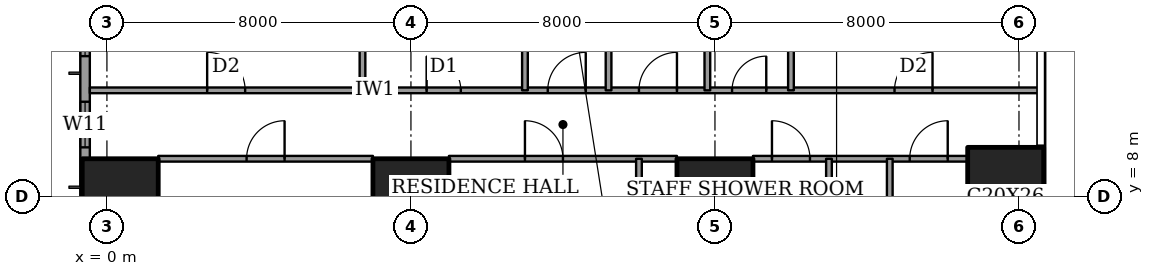
"""IFC4 building model, lengths in metres.
Left out: names, types, materials, properties, quantities, classifications, styles, units other than length and angle.
Written with IfcOpenShell. Run it as: python <this file> out.ifc"""

import sys

from ifc_helpers import new_model, si_unit, direction, frame, frame_2d, origin, origin_2d, place, context, subcontext, project, spatial, rectangle, extrude, element, fill, save


model = new_model("IFC4")
c1 = context("Model", 3, precision=1e-05, world=origin(), true_north=direction((0.0, 1.0)))
c2 = subcontext(c1, "Body", "Model", "MODEL_VIEW")
j1 = project(units=[si_unit("LENGTHUNIT", "METRE"), si_unit("PLANEANGLEUNIT", "RADIAN")], contexts=[c1])
p1 = place(None, origin())
s1 = spatial("IfcSite", under=j1, at=p1, CompositionType="ELEMENT")
p2 = place(p1, origin())
s2 = spatial("IfcBuilding", under=s1, at=p2, CompositionType="ELEMENT")
p3 = place(p2, frame((0.0, 0.0, 103.4)))
s3 = spatial("IfcBuildingStorey", under=s2, at=p3, CompositionType="ELEMENT", Elevation=103.4)
for number, where, z_axis, x_axis in (
    (1, (0.35, 8.0, 0.0), (0.0, 0.0, 1.0), (1.0, 0.0, 0.0)),
    (2, (8.0, 8.0, 0.0), (0.0, 0.0, 1.0), (1.0, 0.0, 0.0)),
    (3, (16.0, 8.0, 0.0), (0.0, 0.0, 1.0), (1.0, 0.0, 0.0)),
):
    element("IfcColumn", number, at=place(p3, frame(where, z_axis=z_axis, x_axis=x_axis)), inside=s3, PredefinedType="COLUMN", context=c2, shape_type="SweptSolid", body=[
        extrude(rectangle(XDim=2.0, YDim=2.0, at=origin_2d()), origin(), (0.0, 0.0, 1.0), 3.6),
    ])
p4 = place(p3, frame((23.65, 8.0, 0.0), z_axis=(0.0, 0.0, 1.0), x_axis=(1.0, 0.0, 0.0)))
e4 = element("IfcColumn", 4, at=p4, inside=s3, PredefinedType="COLUMN", context=c2, shape_type="SweptSolid", body=[
    extrude(rectangle(XDim=2.0, YDim=2.6, at=origin_2d()), origin(), (0.0, 0.0, 1.0), 3.6),
])
p5 = place(p3, frame((-0.575, 44.825, 0.0), z_axis=(0.0, 0.0, 1.0), x_axis=(0.0, -1.0, 0.0)))
e5 = element("IfcWall", 5, at=p5, inside=s3, PredefinedType="SOLIDWALL", context=c2, shape_type="SweptSolid", body=[
    extrude(rectangle(XDim=41.65, YDim=0.25, at=frame_2d((20.825, 0.0))), origin(), (0.0, 0.0, 1.0), 3.6),
])
p6 = place(p5, frame((0.775, 0.0, 0.4)))
e6 = element("IfcOpeningElement", 6, at=p6, cuts=e5, PredefinedType="OPENING", context=c2, shape_type="SweptSolid", body=[
    extrude(rectangle(XDim=2.4, YDim=2.2, at=frame_2d((1.2, 1.1))), frame((0.0, 0.135, 0.0), z_axis=(0.0, -1.0, 0.0), x_axis=(1.0, 0.0, 0.0)), (0.0, 0.0, 1.0), 0.27),
])
p7 = place(p5, frame((6.1, 0.0, 0.4)))
e7 = element("IfcOpeningElement", 7, at=p7, cuts=e5, PredefinedType="OPENING", context=c2, shape_type="SweptSolid", body=[
    extrude(rectangle(XDim=1.2, YDim=2.2, at=frame_2d((0.6, 1.1))), frame((0.0, 0.135, 0.0), z_axis=(0.0, -1.0, 0.0), x_axis=(1.0, 0.0, 0.0)), (0.0, 0.0, 1.0), 0.27),
])
p8 = place(p5, frame((8.425, 0.0, 0.4)))
e8 = element("IfcOpeningElement", 8, at=p8, cuts=e5, PredefinedType="OPENING", context=c2, shape_type="SweptSolid", body=[
    extrude(rectangle(XDim=2.4, YDim=2.2, at=frame_2d((1.2, 1.1))), frame((0.0, 0.135, 0.0), z_axis=(0.0, -1.0, 0.0), x_axis=(1.0, 0.0, 0.0)), (0.0, 0.0, 1.0), 0.27),
])
p9 = place(p5, frame((15.625, 0.0, 0.4)))
e9 = element("IfcOpeningElement", 9, at=p9, cuts=e5, PredefinedType="OPENING", context=c2, shape_type="SweptSolid", body=[
    extrude(rectangle(XDim=2.4, YDim=2.2, at=frame_2d((1.2, 1.1))), frame((0.0, 0.135, 0.0), z_axis=(0.0, -1.0, 0.0), x_axis=(1.0, 0.0, 0.0)), (0.0, 0.0, 1.0), 0.27),
])
p10 = place(p5, frame((23.625, 0.0, 0.4)))
e10 = element("IfcOpeningElement", 10, at=p10, cuts=e5, PredefinedType="OPENING", context=c2, shape_type="SweptSolid", body=[
    extrude(rectangle(XDim=2.4, YDim=2.2, at=frame_2d((1.2, 1.1))), frame((0.0, 0.135, 0.0), z_axis=(0.0, -1.0, 0.0), x_axis=(1.0, 0.0, 0.0)), (0.0, 0.0, 1.0), 0.27),
])
p11 = place(p5, frame((30.725, 0.0, 0.4)))
e11 = element("IfcOpeningElement", 11, at=p11, cuts=e5, PredefinedType="OPENING", context=c2, shape_type="SweptSolid", body=[
    extrude(rectangle(XDim=2.4, YDim=2.2, at=frame_2d((1.2, 1.1))), frame((0.0, 0.135, 0.0), z_axis=(0.0, -1.0, 0.0), x_axis=(1.0, 0.0, 0.0)), (0.0, 0.0, 1.0), 0.27),
])
p12 = place(p5, frame((34.325, 0.0, 0.4)))
e12 = element("IfcOpeningElement", 12, at=p12, cuts=e5, PredefinedType="OPENING", context=c2, shape_type="SweptSolid", body=[
    extrude(rectangle(XDim=1.2, YDim=2.2, at=frame_2d((0.6, 1.1))), frame((0.0, 0.135, 0.0), z_axis=(0.0, -1.0, 0.0), x_axis=(1.0, 0.0, 0.0)), (0.0, 0.0, 1.0), 0.27),
])
p13 = place(p5, frame((38.475, 0.0, 0.4)))
e13 = element("IfcOpeningElement", 13, at=p13, cuts=e5, PredefinedType="OPENING", context=c2, shape_type="SweptSolid", body=[
    extrude(rectangle(XDim=2.4, YDim=2.2, at=frame_2d((1.2, 1.1))), frame((0.0, 0.135, 0.0), z_axis=(0.0, -1.0, 0.0), x_axis=(1.0, 0.0, 0.0)), (0.0, 0.0, 1.0), 0.27),
])
p14 = place(p3, frame((1.35, 9.0, 0.0), z_axis=(0.0, 0.0, 1.0), x_axis=(1.0, 0.0, 0.0)))
e14 = element("IfcWall", 14, at=p14, inside=s3, PredefinedType="PARTITIONING", context=c2, shape_type="SweptSolid", body=[
    extrude(rectangle(XDim=5.65, YDim=0.15, at=frame_2d((2.825, 0.0))), origin(), (0.0, 0.0, 1.0), 3.35),
])
p15 = place(p14, frame((2.325, 0.0, 0.0)))
e15 = element("IfcOpeningElement", 15, at=p15, cuts=e14, PredefinedType="OPENING", context=c2, shape_type="SweptSolid", body=[
    extrude(rectangle(XDim=1.0, YDim=2.1, at=frame_2d((0.5, 1.05))), frame((0.0, 0.085, 0.0), z_axis=(0.0, -1.0, 0.0), x_axis=(1.0, 0.0, 0.0)), (0.0, 0.0, 1.0), 0.17),
])
p16 = place(p3, frame((9.0, 9.0, 0.0), z_axis=(0.0, 0.0, 1.0), x_axis=(1.0, 0.0, 0.0)))
e16 = element("IfcWall", 16, at=p16, inside=s3, PredefinedType="PARTITIONING", context=c2, shape_type="SweptSolid", body=[
    extrude(rectangle(XDim=6.0, YDim=0.15, at=frame_2d((3.0, 0.0))), origin(), (0.0, 0.0, 1.0), 3.35),
])
p17 = place(p16, frame((2.0, 0.0, 0.0)))
e17 = element("IfcOpeningElement", 17, at=p17, cuts=e16, PredefinedType="OPENING", context=c2, shape_type="SweptSolid", body=[
    extrude(rectangle(XDim=1.0, YDim=2.1, at=frame_2d((0.5, 1.05))), frame((0.0, 0.085, 0.0), z_axis=(0.0, -1.0, 0.0), x_axis=(1.0, 0.0, 0.0)), (0.0, 0.0, 1.0), 0.17),
])
p18 = place(p3, frame((17.0, 9.0, 0.0), z_axis=(0.0, 0.0, 1.0), x_axis=(1.0, 0.0, 0.0)))
e18 = element("IfcWall", 18, at=p18, inside=s3, PredefinedType="PARTITIONING", context=c2, shape_type="SweptSolid", body=[
    extrude(rectangle(XDim=5.65, YDim=0.15, at=frame_2d((2.825, 0.0))), origin(), (0.0, 0.0, 1.0), 3.35),
])
p19 = place(p18, frame((0.5, 0.0, 0.0)))
e19 = element("IfcOpeningElement", 19, at=p19, cuts=e18, PredefinedType="OPENING", context=c2, shape_type="SweptSolid", body=[
    extrude(rectangle(XDim=1.0, YDim=2.1, at=frame_2d((0.5, 1.05))), frame((0.0, 0.085, 0.0), z_axis=(0.0, -1.0, 0.0), x_axis=(1.0, 0.0, 0.0)), (0.0, 0.0, 1.0), 0.17),
])
p20 = place(p18, frame((4.125, 0.0, 0.0)))
e20 = element("IfcOpeningElement", 20, at=p20, cuts=e18, PredefinedType="OPENING", context=c2, shape_type="SweptSolid", body=[
    extrude(rectangle(XDim=1.0, YDim=2.1, at=frame_2d((0.5, 1.05))), frame((0.0, 0.085, 0.0), z_axis=(0.0, -1.0, 0.0), x_axis=(1.0, 0.0, 0.0)), (0.0, 0.0, 1.0), 0.17),
])
p21 = place(p3, frame((-0.45, 10.8, 0.0), z_axis=(0.0, 0.0, 1.0), x_axis=(1.0, 0.0, 0.0)))
e21 = element("IfcWall", 21, at=p21, inside=s3, PredefinedType="PARTITIONING", context=c2, shape_type="SweptSolid", body=[
    extrude(rectangle(XDim=25.011, YDim=0.15, at=frame_2d((12.505, 0.0))), origin(), (0.0, 0.0, 1.0), 3.35),
])
p22 = place(p21, frame((12.05, 0.0, 0.0)))
e22 = element("IfcOpeningElement", 22, at=p22, cuts=e21, PredefinedType="OPENING", context=c2, shape_type="SweptSolid", body=[
    extrude(rectangle(XDim=1.0, YDim=2.1, at=frame_2d((0.5, 1.05))), frame((0.0, 0.085, 0.0), z_axis=(0.0, -1.0, 0.0), x_axis=(1.0, 0.0, 0.0)), (0.0, 0.0, 1.0), 0.17),
])
p23 = place(p21, frame((3.087, 0.0, 0.0)))
e23 = element("IfcOpeningElement", 23, at=p23, cuts=e21, PredefinedType="OPENING", context=c2, shape_type="SweptSolid", body=[
    extrude(rectangle(XDim=1.0, YDim=2.1, at=frame_2d((0.5, 1.05))), frame((0.0, 0.085, 0.0), z_axis=(0.0, -1.0, 0.0), x_axis=(1.0, 0.0, 0.0)), (0.0, 0.0, 1.0), 0.17),
])
p24 = place(p21, frame((8.863, 0.0, 0.0)))
e24 = element("IfcOpeningElement", 24, at=p24, cuts=e21, PredefinedType="OPENING", context=c2, shape_type="SweptSolid", body=[
    extrude(rectangle(XDim=0.9, YDim=2.1, at=frame_2d((0.45, 1.05))), frame((0.0, 0.085, 0.0), z_axis=(0.0, -1.0, 0.0), x_axis=(1.0, 0.0, 0.0)), (0.0, 0.0, 1.0), 0.17),
])
p25 = place(p21, frame((14.45, 0.0, 0.0)))
e25 = element("IfcOpeningElement", 25, at=p25, cuts=e21, PredefinedType="OPENING", context=c2, shape_type="SweptSolid", body=[
    extrude(rectangle(XDim=1.0, YDim=2.1, at=frame_2d((0.5, 1.05))), frame((0.0, 0.085, 0.0), z_axis=(0.0, -1.0, 0.0), x_axis=(1.0, 0.0, 0.0)), (0.0, 0.0, 1.0), 0.17),
])
p26 = place(p21, frame((16.9, 0.0, 0.0)))
e26 = element("IfcOpeningElement", 26, at=p26, cuts=e21, PredefinedType="OPENING", context=c2, shape_type="SweptSolid", body=[
    extrude(rectangle(XDim=0.9, YDim=2.1, at=frame_2d((0.45, 1.05))), frame((0.0, 0.085, 0.0), z_axis=(0.0, -1.0, 0.0), x_axis=(1.0, 0.0, 0.0)), (0.0, 0.0, 1.0), 0.17),
])
p27 = place(p21, frame((21.175, 0.0, 0.0)))
e27 = element("IfcOpeningElement", 27, at=p27, cuts=e21, PredefinedType="OPENING", context=c2, shape_type="SweptSolid", body=[
    extrude(rectangle(XDim=1.0, YDim=2.1, at=frame_2d((0.5, 1.05))), frame((0.0, 0.085, 0.0), z_axis=(0.0, -1.0, 0.0), x_axis=(1.0, 0.0, 0.0)), (0.0, 0.0, 1.0), 0.17),
])
p28 = place(p3, frame((6.725, 10.8, 0.0), z_axis=(0.0, 0.0, 1.0), x_axis=(0.0, 1.0, 0.0)))
e28 = element("IfcWall", 28, at=p28, inside=s3, PredefinedType="PARTITIONING", context=c2, shape_type="SweptSolid", body=[
    extrude(rectangle(XDim=4.0, YDim=0.15, at=frame_2d((2.0, 0.0))), origin(), (0.0, 0.0, 1.0), 3.35),
])
p29 = place(p3, frame((11.0, 10.8, 0.0), z_axis=(0.0, 0.0, 1.0), x_axis=(0.0, 1.0, 0.0)))
e29 = element("IfcWall", 29, at=p29, inside=s3, PredefinedType="PARTITIONING", context=c2, shape_type="SweptSolid", body=[
    extrude(rectangle(XDim=10.8, YDim=0.15, at=frame_2d((5.4, 0.0))), origin(), (0.0, 0.0, 1.0), 3.35),
])
p30 = place(p29, frame((8.0, 0.0, 0.0)))
e30 = element("IfcOpeningElement", 30, at=p30, cuts=e29, PredefinedType="OPENING", context=c2, shape_type="SweptSolid", body=[
    extrude(rectangle(XDim=1.0, YDim=2.1, at=frame_2d((0.5, 1.05))), frame((0.0, 0.085, 0.0), z_axis=(0.0, -1.0, 0.0), x_axis=(1.0, 0.0, 0.0)), (0.0, 0.0, 1.0), 0.17),
])
p31 = place(p3, frame((13.2, 10.8, 0.0), z_axis=(0.0, 0.0, 1.0), x_axis=(0.0, 1.0, 0.0)))
e31 = element("IfcWall", 31, at=p31, inside=s3, PredefinedType="PARTITIONING", context=c2, shape_type="SweptSolid", body=[
    extrude(rectangle(XDim=6.2, YDim=0.15, at=frame_2d((3.1, 0.0))), origin(), (0.0, 0.0, 1.0), 3.35),
])
p32 = place(p3, frame((14.0, -0.45, 0.0), z_axis=(0.0, 0.0, 1.0), x_axis=(0.0, 1.0, 0.0)))
e32 = element("IfcWall", 32, at=p32, inside=s3, PredefinedType="PARTITIONING", context=c2, shape_type="SweptSolid", body=[
    extrude(rectangle(XDim=9.45, YDim=0.15, at=frame_2d((4.725, 0.0))), origin(), (0.0, 0.0, 1.0), 3.35),
])
p33 = place(p3, frame((15.8, 10.8, 0.0), z_axis=(0.0, 0.0, 1.0), x_axis=(0.0, 1.0, 0.0)))
e33 = element("IfcWall", 33, at=p33, inside=s3, PredefinedType="PARTITIONING", context=c2, shape_type="SweptSolid", body=[
    extrude(rectangle(XDim=4.0, YDim=0.15, at=frame_2d((2.0, 0.0))), origin(), (0.0, 0.0, 1.0), 3.35),
])
p34 = place(p3, frame((18.0, 10.8, 0.0), z_axis=(0.0, 0.0, 1.0), x_axis=(0.0, 1.0, 0.0)))
e34 = element("IfcWall", 34, at=p34, inside=s3, PredefinedType="PARTITIONING", context=c2, shape_type="SweptSolid", body=[
    extrude(rectangle(XDim=6.2, YDim=0.15, at=frame_2d((3.1, 0.0))), origin(), (0.0, 0.0, 1.0), 3.35),
])
p35 = place(p3, frame((19.0, -0.45, 0.0), z_axis=(0.0, 0.0, 1.0), x_axis=(0.0, 1.0, 0.0)))
e35 = element("IfcWall", 35, at=p35, inside=s3, PredefinedType="PARTITIONING", context=c2, shape_type="SweptSolid", body=[
    extrude(rectangle(XDim=9.45, YDim=0.15, at=frame_2d((4.725, 0.0))), origin(), (0.0, 0.0, 1.0), 3.35),
])
p36 = place(p3, frame((20.6, -0.45, 0.0), z_axis=(0.0, 0.0, 1.0), x_axis=(0.0, 1.0, 0.0)))
e36 = element("IfcWall", 36, at=p36, inside=s3, PredefinedType="PARTITIONING", context=c2, shape_type="SweptSolid", body=[
    extrude(rectangle(XDim=9.45, YDim=0.15, at=frame_2d((4.725, 0.0))), origin(), (0.0, 0.0, 1.0), 3.35),
])
p37 = place(p36, frame((4.275, 0.0, 0.0)))
e37 = element("IfcOpeningElement", 37, at=p37, cuts=e36, PredefinedType="OPENING", context=c2, shape_type="SweptSolid", body=[
    extrude(rectangle(XDim=0.9, YDim=2.1, at=frame_2d((0.45, 1.05))), frame((0.0, 0.085, 0.0), z_axis=(0.0, -1.0, 0.0), x_axis=(1.0, 0.0, 0.0)), (0.0, 0.0, 1.0), 0.17),
])
p38 = place(p11, origin())
e38 = element("IfcWindow", 38, at=p38, inside=s3, PartitioningType="SINGLE_PANEL", PredefinedType="WINDOW", context=c2, shape_type="SweptSolid", body=[
    extrude(rectangle(XDim=2.4, YDim=2.2, at=frame_2d((1.2, 1.1))), frame((0.0, 0.03, 0.0), z_axis=(0.0, -1.0, 0.0), x_axis=(1.0, 0.0, 0.0)), (0.0, 0.0, 1.0), 0.06),
])
fill(e11, e38)
p39 = place(p12, origin())
e39 = element("IfcWindow", 39, at=p39, inside=s3, PartitioningType="SINGLE_PANEL", PredefinedType="WINDOW", context=c2, shape_type="SweptSolid", body=[
    extrude(rectangle(XDim=1.2, YDim=2.2, at=frame_2d((0.6, 1.1))), frame((0.0, 0.03, 0.0), z_axis=(0.0, -1.0, 0.0), x_axis=(1.0, 0.0, 0.0)), (0.0, 0.0, 1.0), 0.06),
])
fill(e12, e39)
p40 = place(p15, origin())
e40 = element("IfcDoor", 40, at=p40, inside=s3, OperationType="SINGLE_SWING_LEFT", PredefinedType="DOOR", context=c2, shape_type="SweptSolid", body=[
    extrude(rectangle(XDim=1.0, YDim=2.1, at=frame_2d((0.5, 1.05))), frame((0.0, 0.025, 0.0), z_axis=(0.0, -1.0, 0.0), x_axis=(1.0, 0.0, 0.0)), (0.0, 0.0, 1.0), 0.05),
])
fill(e15, e40)
p41 = place(p17, origin())
e41 = element("IfcDoor", 41, at=p41, inside=s3, OperationType="SINGLE_SWING_RIGHT", PredefinedType="DOOR", context=c2, shape_type="SweptSolid", body=[
    extrude(rectangle(XDim=1.0, YDim=2.1, at=frame_2d((0.5, 1.05))), frame((0.0, 0.025, 0.0), z_axis=(0.0, -1.0, 0.0), x_axis=(1.0, 0.0, 0.0)), (0.0, 0.0, 1.0), 0.05),
])
fill(e17, e41)
p42 = place(p19, origin())
e42 = element("IfcDoor", 42, at=p42, inside=s3, OperationType="SINGLE_SWING_RIGHT", PredefinedType="DOOR", context=c2, shape_type="SweptSolid", body=[
    extrude(rectangle(XDim=1.0, YDim=2.1, at=frame_2d((0.5, 1.05))), frame((0.0, 0.025, 0.0), z_axis=(0.0, -1.0, 0.0), x_axis=(1.0, 0.0, 0.0)), (0.0, 0.0, 1.0), 0.05),
])
fill(e19, e42)
p43 = place(p20, origin())
e43 = element("IfcDoor", 43, at=p43, inside=s3, OperationType="SINGLE_SWING_LEFT", PredefinedType="DOOR", context=c2, shape_type="SweptSolid", body=[
    extrude(rectangle(XDim=1.0, YDim=2.1, at=frame_2d((0.5, 1.05))), frame((0.0, 0.025, 0.0), z_axis=(0.0, -1.0, 0.0), x_axis=(1.0, 0.0, 0.0)), (0.0, 0.0, 1.0), 0.05),
])
fill(e20, e43)
p44 = place(p22, origin())
e44 = element("IfcDoor", 44, at=p44, inside=s3, OperationType="SINGLE_SWING_LEFT", PredefinedType="DOOR", context=c2, shape_type="SweptSolid", body=[
    extrude(rectangle(XDim=1.0, YDim=2.1, at=frame_2d((0.5, 1.05))), frame((0.0, 0.025, 0.0), z_axis=(0.0, -1.0, 0.0), x_axis=(1.0, 0.0, 0.0)), (0.0, 0.0, 1.0), 0.05),
])
fill(e22, e44)
p45 = place(p23, origin())
e45 = element("IfcDoor", 45, at=p45, inside=s3, OperationType="SINGLE_SWING_RIGHT", PredefinedType="DOOR", context=c2, shape_type="SweptSolid", body=[
    extrude(rectangle(XDim=1.0, YDim=2.1, at=frame_2d((0.5, 1.05))), frame((0.0, 0.025, 0.0), z_axis=(0.0, -1.0, 0.0), x_axis=(1.0, 0.0, 0.0)), (0.0, 0.0, 1.0), 0.05),
])
fill(e23, e45)
p46 = place(p24, origin())
e46 = element("IfcDoor", 46, at=p46, inside=s3, OperationType="SINGLE_SWING_RIGHT", PredefinedType="DOOR", context=c2, shape_type="SweptSolid", body=[
    extrude(rectangle(XDim=0.9, YDim=2.1, at=frame_2d((0.45, 1.05))), frame((0.0, 0.025, 0.0), z_axis=(0.0, -1.0, 0.0), x_axis=(1.0, 0.0, 0.0)), (0.0, 0.0, 1.0), 0.05),
])
fill(e24, e46)
p47 = place(p25, origin())
e47 = element("IfcDoor", 47, at=p47, inside=s3, OperationType="SINGLE_SWING_LEFT", PredefinedType="DOOR", context=c2, shape_type="SweptSolid", body=[
    extrude(rectangle(XDim=1.0, YDim=2.1, at=frame_2d((0.5, 1.05))), frame((0.0, 0.025, 0.0), z_axis=(0.0, -1.0, 0.0), x_axis=(1.0, 0.0, 0.0)), (0.0, 0.0, 1.0), 0.05),
])
fill(e25, e47)
p48 = place(p26, origin())
e48 = element("IfcDoor", 48, at=p48, inside=s3, OperationType="SINGLE_SWING_LEFT", PredefinedType="DOOR", context=c2, shape_type="SweptSolid", body=[
    extrude(rectangle(XDim=0.9, YDim=2.1, at=frame_2d((0.45, 1.05))), frame((0.0, 0.025, 0.0), z_axis=(0.0, -1.0, 0.0), x_axis=(1.0, 0.0, 0.0)), (0.0, 0.0, 1.0), 0.05),
])
fill(e26, e48)
p49 = place(p27, origin())
e49 = element("IfcDoor", 49, at=p49, inside=s3, OperationType="SINGLE_SWING_LEFT", PredefinedType="DOOR", context=c2, shape_type="SweptSolid", body=[
    extrude(rectangle(XDim=1.0, YDim=2.1, at=frame_2d((0.5, 1.05))), frame((0.0, 0.025, 0.0), z_axis=(0.0, -1.0, 0.0), x_axis=(1.0, 0.0, 0.0)), (0.0, 0.0, 1.0), 0.05),
])
fill(e27, e49)
save(model, sys.argv[1])
